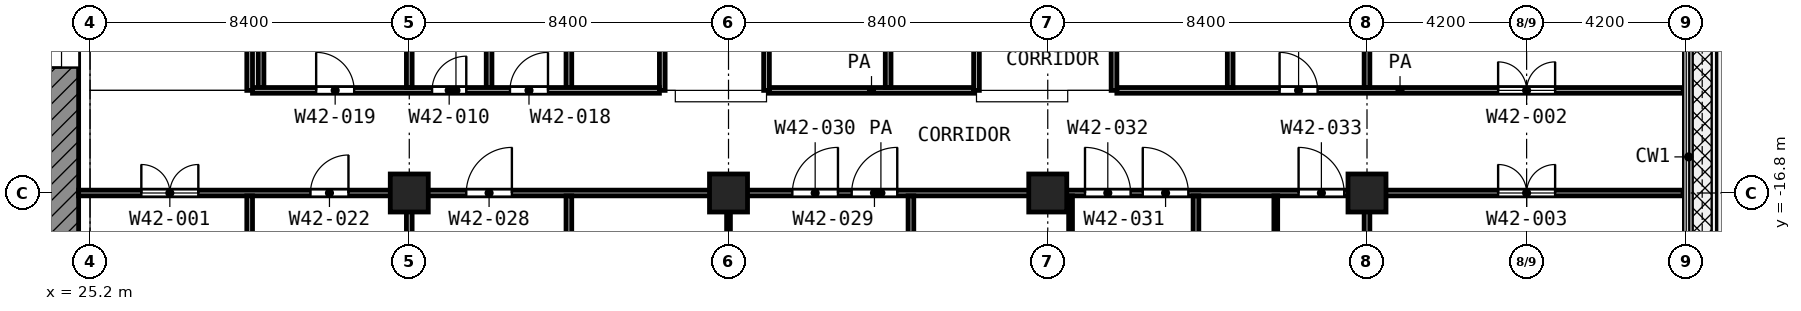
"""IFC4 building model, lengths in metres.
Left out: names, types, materials, properties, quantities, classifications, styles, units other than length and angle.
Written with IfcOpenShell. Run it as: python <this file> out.ifc"""

import sys

from ifc_helpers import new_model, si_unit, direction, frame, frame_2d, origin, origin_2d, place, context, subcontext, project, spatial, rectangle, extrude, element, fill, save


model = new_model("IFC4")
c1 = context("Model", 3, precision=1e-05, world=origin(), true_north=direction((0.0, 1.0)))
c2 = subcontext(c1, "Body", "Model", "MODEL_VIEW")
j1 = project(units=[si_unit("LENGTHUNIT", "METRE"), si_unit("PLANEANGLEUNIT", "RADIAN")], contexts=[c1])
p1 = place(None, origin())
s1 = spatial("IfcSite", under=j1, at=p1, CompositionType="ELEMENT")
p2 = place(p1, origin())
s2 = spatial("IfcBuilding", under=s1, at=p2, CompositionType="ELEMENT")
p3 = place(p2, frame((0.0, 0.0, 183.6)))
s3 = spatial("IfcBuildingStorey", under=s2, at=p3, CompositionType="ELEMENT", Elevation=183.6)
for number, where, z_axis, x_axis in (
    (1, (33.6, -16.8, 0.0), (0.0, 0.0, 1.0), (1.0, 0.0, 0.0)),
    (2, (42.0, -16.8, 0.0), (0.0, 0.0, 1.0), (1.0, 0.0, 0.0)),
    (3, (50.4, -16.8, 0.0), (0.0, 0.0, 1.0), (1.0, 0.0, 0.0)),
    (4, (58.8, -16.8, 0.0), (0.0, 0.0, 1.0), (1.0, 0.0, 0.0)),
):
    element("IfcColumn", number, at=place(p3, frame(where, z_axis=z_axis, x_axis=x_axis)), inside=s3, PredefinedType="COLUMN", context=c2, shape_type="SweptSolid", body=[
        extrude(rectangle(XDim=1.0, YDim=1.0, at=origin_2d()), origin(), (0.0, 0.0, 1.0), 4.2),
    ])
p4 = place(p3, frame((24.45, -24.0, 0.0), z_axis=(0.0, 0.0, 1.0), x_axis=(0.0, 1.0, 0.0)))
e5 = element("IfcWall", 5, at=p4, inside=s3, PredefinedType="SHEAR", context=c2, shape_type="SweptSolid", body=[
    extrude(rectangle(XDim=18.6, YDim=0.9, at=frame_2d((9.3, 0.0))), origin(), (0.0, 0.0, 1.0), 3.6),
])
p5 = place(p4, frame((10.5, 0.0, 0.0)))
e6 = element("IfcOpeningElement", 6, at=p5, cuts=e5, PredefinedType="OPENING", context=c2, shape_type="SweptSolid", body=[
    extrude(rectangle(XDim=1.8, YDim=2.1, at=frame_2d((0.9, 1.05))), frame((0.0, 0.46, 0.0), z_axis=(0.0, -1.0, 0.0), x_axis=(1.0, 0.0, 0.0)), (0.0, 0.0, 1.0), 0.92),
])
p6 = place(p3, frame((42.0, -26.35, 0.0), z_axis=(0.0, 0.0, 1.0), x_axis=(0.0, 1.0, 0.0)))
e7 = element("IfcWall", 7, at=p6, inside=s3, PredefinedType="PARTITIONING", context=c2, shape_type="SweptSolid", body=[
    extrude(rectangle(XDim=9.475, YDim=0.1, at=frame_2d((4.738, 0.0))), origin(), (0.0, 0.0, 1.0), 3.6),
])
p7 = place(p6, frame((4.25, 0.0, 0.0)))
e8 = element("IfcOpeningElement", 8, at=p7, cuts=e7, PredefinedType="OPENING", context=c2, shape_type="SweptSolid", body=[
    extrude(rectangle(XDim=1.0, YDim=2.1, at=frame_2d((0.5, 1.05))), frame((0.0, 0.06, 0.0), z_axis=(0.0, -1.0, 0.0), x_axis=(1.0, 0.0, 0.0)), (0.0, 0.0, 1.0), 0.12),
])
p8 = place(p3, frame((51.0, -26.35, 0.0), z_axis=(0.0, 0.0, 1.0), x_axis=(0.0, 1.0, 0.0)))
e9 = element("IfcWall", 9, at=p8, inside=s3, PredefinedType="PARTITIONING", context=c2, shape_type="SweptSolid", body=[
    extrude(rectangle(XDim=9.475, YDim=0.1, at=frame_2d((4.738, 0.0))), origin(), (0.0, 0.0, 1.0), 3.6),
])
p9 = place(p8, frame((4.25, 0.0, 0.0)))
e10 = element("IfcOpeningElement", 10, at=p9, cuts=e9, PredefinedType="OPENING", context=c2, shape_type="SweptSolid", body=[
    extrude(rectangle(XDim=1.0, YDim=2.1, at=frame_2d((0.5, 1.05))), frame((0.0, 0.06, 0.0), z_axis=(0.0, -1.0, 0.0), x_axis=(1.0, 0.0, 0.0)), (0.0, 0.0, 1.0), 0.12),
])
p10 = place(p3, frame((56.4, -20.1, 0.0), z_axis=(0.0, 0.0, 1.0), x_axis=(0.0, 1.0, 0.0)))
e11 = element("IfcWall", 11, at=p10, inside=s3, PredefinedType="PARTITIONING", context=c2, shape_type="SweptSolid", body=[
    extrude(rectangle(XDim=3.225, YDim=0.1, at=frame_2d((1.613, 0.0))), origin(), (0.0, 0.0, 1.0), 3.6),
])
p11 = place(p3, frame((24.9, -16.8, 0.0), z_axis=(0.0, 0.0, 1.0), x_axis=(1.0, 0.0, 0.0)))
e12 = element("IfcWall", 12, at=p11, inside=s3, PredefinedType="PARTITIONING", context=c2, shape_type="SweptSolid", body=[
    extrude(rectangle(XDim=42.22, YDim=0.15, at=frame_2d((21.11, 0.0))), origin(), (0.0, 0.0, 1.0), 3.6),
])
p12 = place(p11, frame((1.65, 0.0, 0.0)))
e13 = element("IfcOpeningElement", 13, at=p12, cuts=e12, PredefinedType="OPENING", context=c2, shape_type="SweptSolid", body=[
    extrude(rectangle(XDim=1.5, YDim=2.1, at=frame_2d((0.75, 1.05))), frame((0.0, 0.085, 0.0), z_axis=(0.0, -1.0, 0.0), x_axis=(1.0, 0.0, 0.0)), (0.0, 0.0, 1.0), 0.17),
])
p13 = place(p11, frame((6.1, 0.0, 0.0)))
e14 = element("IfcOpeningElement", 14, at=p13, cuts=e12, PredefinedType="OPENING", context=c2, shape_type="SweptSolid", body=[
    extrude(rectangle(XDim=1.0, YDim=2.1, at=frame_2d((0.5, 1.05))), frame((0.0, 0.085, 0.0), z_axis=(0.0, -1.0, 0.0), x_axis=(1.0, 0.0, 0.0)), (0.0, 0.0, 1.0), 0.17),
])
p14 = place(p11, frame((10.2, 0.0, 0.0)))
e15 = element("IfcOpeningElement", 15, at=p14, cuts=e12, PredefinedType="OPENING", context=c2, shape_type="SweptSolid", body=[
    extrude(rectangle(XDim=1.2, YDim=2.1, at=frame_2d((0.6, 1.05))), frame((0.0, 0.085, 0.0), z_axis=(0.0, -1.0, 0.0), x_axis=(1.0, 0.0, 0.0)), (0.0, 0.0, 1.0), 0.17),
])
p15 = place(p11, frame((20.34, 0.0, 0.0)))
e16 = element("IfcOpeningElement", 16, at=p15, cuts=e12, PredefinedType="OPENING", context=c2, shape_type="SweptSolid", body=[
    extrude(rectangle(XDim=1.2, YDim=2.1, at=frame_2d((0.6, 1.05))), frame((0.0, 0.085, 0.0), z_axis=(0.0, -1.0, 0.0), x_axis=(1.0, 0.0, 0.0)), (0.0, 0.0, 1.0), 0.17),
])
p16 = place(p11, frame((18.78, 0.0, 0.0)))
e17 = element("IfcOpeningElement", 17, at=p16, cuts=e12, PredefinedType="OPENING", context=c2, shape_type="SweptSolid", body=[
    extrude(rectangle(XDim=1.2, YDim=2.1, at=frame_2d((0.6, 1.05))), frame((0.0, 0.085, 0.0), z_axis=(0.0, -1.0, 0.0), x_axis=(1.0, 0.0, 0.0)), (0.0, 0.0, 1.0), 0.17),
])
p17 = place(p11, frame((28.0, 0.0, 0.0)))
e18 = element("IfcOpeningElement", 18, at=p17, cuts=e12, PredefinedType="OPENING", context=c2, shape_type="SweptSolid", body=[
    extrude(rectangle(XDim=1.2, YDim=2.1, at=frame_2d((0.6, 1.05))), frame((0.0, 0.085, 0.0), z_axis=(0.0, -1.0, 0.0), x_axis=(1.0, 0.0, 0.0)), (0.0, 0.0, 1.0), 0.17),
])
p18 = place(p11, frame((26.48, 0.0, 0.0)))
e19 = element("IfcOpeningElement", 19, at=p18, cuts=e12, PredefinedType="OPENING", context=c2, shape_type="SweptSolid", body=[
    extrude(rectangle(XDim=1.2, YDim=2.1, at=frame_2d((0.6, 1.05))), frame((0.0, 0.085, 0.0), z_axis=(0.0, -1.0, 0.0), x_axis=(1.0, 0.0, 0.0)), (0.0, 0.0, 1.0), 0.17),
])
p19 = place(p11, frame((32.1, 0.0, 0.0)))
e20 = element("IfcOpeningElement", 20, at=p19, cuts=e12, PredefinedType="OPENING", context=c2, shape_type="SweptSolid", body=[
    extrude(rectangle(XDim=1.2, YDim=2.1, at=frame_2d((0.6, 1.05))), frame((0.0, 0.085, 0.0), z_axis=(0.0, -1.0, 0.0), x_axis=(1.0, 0.0, 0.0)), (0.0, 0.0, 1.0), 0.17),
])
p20 = place(p11, frame((37.35, 0.0, 0.0)))
e21 = element("IfcOpeningElement", 21, at=p20, cuts=e12, PredefinedType="OPENING", context=c2, shape_type="SweptSolid", body=[
    extrude(rectangle(XDim=1.5, YDim=2.1, at=frame_2d((0.75, 1.05))), frame((0.0, 0.085, 0.0), z_axis=(0.0, -1.0, 0.0), x_axis=(1.0, 0.0, 0.0)), (0.0, 0.0, 1.0), 0.17),
])
p21 = place(p3, frame((29.475, -14.1, 0.0), z_axis=(0.0, 0.0, 1.0), x_axis=(1.0, 0.0, 0.0)))
e22 = element("IfcWall", 22, at=p21, inside=s3, PredefinedType="PARTITIONING", context=c2, shape_type="SweptSolid", body=[
    extrude(rectangle(XDim=10.707, YDim=0.15, at=frame_2d((5.354, 0.0))), origin(), (0.0, 0.0, 1.0), 3.6),
])
p22 = place(p21, frame((1.675, 0.0, 0.0)))
e23 = element("IfcOpeningElement", 23, at=p22, cuts=e22, PredefinedType="OPENING", context=c2, shape_type="SweptSolid", body=[
    extrude(rectangle(XDim=1.0, YDim=2.1, at=frame_2d((0.5, 1.05))), frame((0.0, 0.085, 0.0), z_axis=(0.0, -1.0, 0.0), x_axis=(1.0, 0.0, 0.0)), (0.0, 0.0, 1.0), 0.17),
])
p23 = place(p21, frame((4.725, 0.0, 0.0)))
e24 = element("IfcOpeningElement", 24, at=p23, cuts=e22, PredefinedType="OPENING", context=c2, shape_type="SweptSolid", body=[
    extrude(rectangle(XDim=0.9, YDim=2.1, at=frame_2d((0.45, 1.05))), frame((0.0, 0.085, 0.0), z_axis=(0.0, -1.0, 0.0), x_axis=(1.0, 0.0, 0.0)), (0.0, 0.0, 1.0), 0.17),
])
p24 = place(p21, frame((6.775, 0.0, 0.0)))
e25 = element("IfcOpeningElement", 25, at=p24, cuts=e22, PredefinedType="OPENING", context=c2, shape_type="SweptSolid", body=[
    extrude(rectangle(XDim=1.0, YDim=2.1, at=frame_2d((0.5, 1.05))), frame((0.0, 0.085, 0.0), z_axis=(0.0, -1.0, 0.0), x_axis=(1.0, 0.0, 0.0)), (0.0, 0.0, 1.0), 0.17),
])
p25 = place(p3, frame((43.075, -14.1, 0.0), z_axis=(0.0, 0.0, 1.0), x_axis=(1.0, 0.0, 0.0)))
e26 = element("IfcWall", 26, at=p25, inside=s3, PredefinedType="PARTITIONING", context=c2, shape_type="SweptSolid", body=[
    extrude(rectangle(XDim=5.375, YDim=0.15, at=frame_2d((2.688, 0.0))), origin(), (0.0, 0.0, 1.0), 3.6),
])
p26 = place(p3, frame((52.218, -14.1, 0.0), z_axis=(0.0, 0.0, 1.0), x_axis=(1.0, 0.0, 0.0)))
e27 = element("IfcWall", 27, at=p26, inside=s3, PredefinedType="PARTITIONING", context=c2, shape_type="SweptSolid", body=[
    extrude(rectangle(XDim=14.902, YDim=0.15, at=frame_2d((7.451, 0.0))), origin(), (0.0, 0.0, 1.0), 3.6),
])
p27 = place(p26, frame((4.282, 0.0, 0.0)))
e28 = element("IfcOpeningElement", 28, at=p27, cuts=e27, PredefinedType="OPENING", context=c2, shape_type="SweptSolid", body=[
    extrude(rectangle(XDim=1.0, YDim=2.1, at=frame_2d((0.5, 1.05))), frame((0.0, 0.085, 0.0), z_axis=(0.0, -1.0, 0.0), x_axis=(1.0, 0.0, 0.0)), (0.0, 0.0, 1.0), 0.17),
])
p28 = place(p26, frame((10.032, 0.0, 0.0)))
e29 = element("IfcOpeningElement", 29, at=p28, cuts=e27, PredefinedType="OPENING", context=c2, shape_type="SweptSolid", body=[
    extrude(rectangle(XDim=1.5, YDim=2.1, at=frame_2d((0.75, 1.05))), frame((0.0, 0.085, 0.0), z_axis=(0.0, -1.0, 0.0), x_axis=(1.0, 0.0, 0.0)), (0.0, 0.0, 1.0), 0.17),
])
p29 = place(p3, frame((29.4, -31.198, 0.0), z_axis=(0.0, 0.0, 1.0), x_axis=(0.0, 1.0, 0.0)))
e30 = element("IfcWall", 30, at=p29, inside=s3, PredefinedType="PARTITIONING", context=c2, shape_type="SweptSolid", body=[
    extrude(rectangle(XDim=14.323, YDim=0.15, at=frame_2d((7.162, 0.0))), origin(), (0.0, 0.0, 1.0), 3.6),
])
p30 = place(p3, frame((29.4, -14.1, 0.0), z_axis=(0.0, 0.0, 1.0), x_axis=(0.0, 1.0, 0.0)))
e31 = element("IfcWall", 31, at=p30, inside=s3, PredefinedType="PARTITIONING", context=c2, shape_type="SweptSolid", body=[
    extrude(rectangle(XDim=2.998, YDim=0.15, at=frame_2d((1.499, 0.0))), origin(), (0.0, 0.0, 1.0), 3.6),
])
p31 = place(p3, frame((29.7, -14.025, 0.0), z_axis=(0.0, 0.0, 1.0), x_axis=(0.0, 1.0, 0.0)))
e32 = element("IfcWall", 32, at=p31, inside=s3, PredefinedType="PARTITIONING", context=c2, shape_type="SweptSolid", body=[
    extrude(rectangle(XDim=13.945, YDim=0.15, at=frame_2d((6.972, 0.0))), origin(), (0.0, 0.0, 1.0), 2.7),
])
p32 = place(p3, frame((33.6, -31.12, 0.0), z_axis=(0.0, 0.0, 1.0), x_axis=(0.0, 1.0, 0.0)))
e33 = element("IfcWall", 33, at=p32, inside=s3, PredefinedType="PARTITIONING", context=c2, shape_type="SweptSolid", body=[
    extrude(rectangle(XDim=14.245, YDim=0.15, at=frame_2d((7.123, 0.0))), origin(), (0.0, 0.0, 1.0), 3.6),
])
p33 = place(p3, frame((33.6, -14.025, 0.0), z_axis=(0.0, 0.0, 1.0), x_axis=(0.0, 1.0, 0.0)))
e34 = element("IfcWall", 34, at=p33, inside=s3, PredefinedType="PARTITIONING", context=c2, shape_type="SweptSolid", body=[
    extrude(rectangle(XDim=5.125, YDim=0.15, at=frame_2d((2.562, 0.0))), origin(), (0.0, 0.0, 1.0), 3.6),
])
p34 = place(p3, frame((35.7, -14.025, 0.0), z_axis=(0.0, 0.0, 1.0), x_axis=(0.0, 1.0, 0.0)))
e35 = element("IfcWall", 35, at=p34, inside=s3, PredefinedType="PARTITIONING", context=c2, shape_type="SweptSolid", body=[
    extrude(rectangle(XDim=13.945, YDim=0.15, at=frame_2d((6.972, 0.0))), origin(), (0.0, 0.0, 1.0), 2.7),
])
p35 = place(p3, frame((37.8, -31.12, 0.0), z_axis=(0.0, 0.0, 1.0), x_axis=(0.0, 1.0, 0.0)))
e36 = element("IfcWall", 36, at=p35, inside=s3, PredefinedType="PARTITIONING", context=c2, shape_type="SweptSolid", body=[
    extrude(rectangle(XDim=14.245, YDim=0.15, at=frame_2d((7.123, 0.0))), origin(), (0.0, 0.0, 1.0), 3.6),
])
p36 = place(p3, frame((37.8, -14.025, 0.0), z_axis=(0.0, 0.0, 1.0), x_axis=(0.0, 1.0, 0.0)))
e37 = element("IfcWall", 37, at=p36, inside=s3, PredefinedType="PARTITIONING", context=c2, shape_type="SweptSolid", body=[
    extrude(rectangle(XDim=13.945, YDim=0.15, at=frame_2d((6.972, 0.0))), origin(), (0.0, 0.0, 1.0), 2.7),
])
p37 = place(p3, frame((40.257, -14.1, 0.0), z_axis=(0.0, 0.0, 1.0), x_axis=(0.0, 1.0, 0.0)))
e38 = element("IfcWall", 38, at=p37, inside=s3, PredefinedType="PARTITIONING", context=c2, shape_type="SweptSolid", body=[
    extrude(rectangle(XDim=14.02, YDim=0.15, at=frame_2d((7.01, 0.0))), origin(), (0.0, 0.0, 1.0), 2.7),
])
p38 = place(p37, frame((6.374, 0.0, 0.0)))
e39 = element("IfcOpeningElement", 39, at=p38, cuts=e38, PredefinedType="OPENING", context=c2, shape_type="SweptSolid", body=[
    extrude(rectangle(XDim=1.0, YDim=2.1, at=frame_2d((0.5, 1.05))), frame((0.0, 0.085, 0.0), z_axis=(0.0, -1.0, 0.0), x_axis=(1.0, 0.0, 0.0)), (0.0, 0.0, 1.0), 0.17),
])
p39 = place(p3, frame((43.0, -14.1, 0.0), z_axis=(0.0, 0.0, 1.0), x_axis=(0.0, 1.0, 0.0)))
e40 = element("IfcWall", 40, at=p39, inside=s3, PredefinedType="PARTITIONING", context=c2, shape_type="SweptSolid", body=[
    extrude(rectangle(XDim=5.2, YDim=0.15, at=frame_2d((2.6, 0.0))), origin(), (0.0, 0.0, 1.0), 3.6),
])
p40 = place(p39, frame((2.0, 0.0, 0.0)))
e41 = element("IfcOpeningElement", 41, at=p40, cuts=e40, PredefinedType="OPENING", context=c2, shape_type="SweptSolid", body=[
    extrude(rectangle(XDim=1.2, YDim=2.1, at=frame_2d((0.6, 1.05))), frame((0.0, 0.085, 0.0), z_axis=(0.0, -1.0, 0.0), x_axis=(1.0, 0.0, 0.0)), (0.0, 0.0, 1.0), 0.17),
])
p41 = place(p3, frame((46.2, -14.025, 0.0), z_axis=(0.0, 0.0, 1.0), x_axis=(0.0, 1.0, 0.0)))
e42 = element("IfcWall", 42, at=p41, inside=s3, PredefinedType="PARTITIONING", context=c2, shape_type="SweptSolid", body=[
    extrude(rectangle(XDim=5.295, YDim=0.15, at=frame_2d((2.647, 0.0))), origin(), (0.0, 0.0, 1.0), 3.6),
])
p42 = place(p3, frame((46.8, -31.12, 0.0), z_axis=(0.0, 0.0, 1.0), x_axis=(0.0, 1.0, 0.0)))
e43 = element("IfcWall", 43, at=p42, inside=s3, PredefinedType="PARTITIONING", context=c2, shape_type="SweptSolid", body=[
    extrude(rectangle(XDim=14.245, YDim=0.15, at=frame_2d((7.123, 0.0))), origin(), (0.0, 0.0, 1.0), 3.6),
])
p43 = place(p3, frame((48.525, -14.1, 0.0), z_axis=(0.0, 0.0, 1.0), x_axis=(0.0, 1.0, 0.0)))
e44 = element("IfcWall", 44, at=p43, inside=s3, PredefinedType="PARTITIONING", context=c2, shape_type="SweptSolid", body=[
    extrude(rectangle(XDim=5.37, YDim=0.15, at=frame_2d((2.685, 0.0))), origin(), (0.0, 0.0, 1.0), 3.6),
])
p44 = place(p43, frame((2.185, 0.0, 0.0)))
e45 = element("IfcOpeningElement", 45, at=p44, cuts=e44, PredefinedType="OPENING", context=c2, shape_type="SweptSolid", body=[
    extrude(rectangle(XDim=1.0, YDim=2.1, at=frame_2d((0.5, 1.05))), frame((0.0, 0.085, 0.0), z_axis=(0.0, -1.0, 0.0), x_axis=(1.0, 0.0, 0.0)), (0.0, 0.0, 1.0), 0.17),
])
p45 = place(p3, frame((52.143, -14.1, 0.0), z_axis=(0.0, 0.0, 1.0), x_axis=(0.0, 1.0, 0.0)))
e46 = element("IfcWall", 46, at=p45, inside=s3, PredefinedType="PARTITIONING", context=c2, shape_type="SweptSolid", body=[
    extrude(rectangle(XDim=12.249, YDim=0.15, at=frame_2d((6.125, 0.0))), origin(), (0.0, 0.0, 1.0), 3.6),
])
p46 = place(p45, frame((6.224, 0.0, 0.0)))
e47 = element("IfcOpeningElement", 47, at=p46, cuts=e46, PredefinedType="OPENING", context=c2, shape_type="SweptSolid", body=[
    extrude(rectangle(XDim=1.0, YDim=2.1, at=frame_2d((0.5, 1.05))), frame((0.0, 0.085, 0.0), z_axis=(0.0, -1.0, 0.0), x_axis=(1.0, 0.0, 0.0)), (0.0, 0.0, 1.0), 0.17),
])
p47 = place(p3, frame((54.3, -31.12, 0.0), z_axis=(0.0, 0.0, 1.0), x_axis=(0.0, 1.0, 0.0)))
e48 = element("IfcWall", 48, at=p47, inside=s3, PredefinedType="PARTITIONING", context=c2, shape_type="SweptSolid", body=[
    extrude(rectangle(XDim=14.245, YDim=0.15, at=frame_2d((7.123, 0.0))), origin(), (0.0, 0.0, 1.0), 3.6),
])
p48 = place(p3, frame((55.2, -14.025, 0.0), z_axis=(0.0, 0.0, 1.0), x_axis=(0.0, 1.0, 0.0)))
e49 = element("IfcWall", 49, at=p48, inside=s3, PredefinedType="PARTITIONING", context=c2, shape_type="SweptSolid", body=[
    extrude(rectangle(XDim=13.945, YDim=0.15, at=frame_2d((6.972, 0.0))), origin(), (0.0, 0.0, 1.0), 2.7),
])
p49 = place(p3, frame((58.8, -31.12, 0.0), z_axis=(0.0, 0.0, 1.0), x_axis=(0.0, 1.0, 0.0)))
e50 = element("IfcWall", 50, at=p49, inside=s3, PredefinedType="PARTITIONING", context=c2, shape_type="SweptSolid", body=[
    extrude(rectangle(XDim=14.245, YDim=0.15, at=frame_2d((7.123, 0.0))), origin(), (0.0, 0.0, 1.0), 3.6),
])
p50 = place(p3, frame((58.8, -14.025, 0.0), z_axis=(0.0, 0.0, 1.0), x_axis=(0.0, 1.0, 0.0)))
e51 = element("IfcWall", 51, at=p50, inside=s3, PredefinedType="PARTITIONING", context=c2, shape_type="SweptSolid", body=[
    extrude(rectangle(XDim=13.945, YDim=0.15, at=frame_2d((6.972, 0.0))), origin(), (0.0, 0.0, 1.0), 2.7),
])
p51 = place(p5, origin())
e52 = element("IfcDoor", 52, at=p51, inside=s3, OperationType="DOUBLE_DOOR_SINGLE_SWING", PredefinedType="DOOR", context=c2, shape_type="SweptSolid", body=[
    extrude(rectangle(XDim=1.8, YDim=2.1, at=frame_2d((0.9, 1.05))), frame((0.0, 0.025, 0.0), z_axis=(0.0, -1.0, 0.0), x_axis=(1.0, 0.0, 0.0)), (0.0, 0.0, 1.0), 0.05),
])
fill(e6, e52)
p52 = place(p12, origin())
e53 = element("IfcDoor", 53, at=p52, inside=s3, OperationType="DOUBLE_DOOR_SINGLE_SWING", PredefinedType="DOOR", context=c2, shape_type="SweptSolid", body=[
    extrude(rectangle(XDim=1.5, YDim=2.1, at=frame_2d((0.75, 1.05))), frame((0.0, 0.025, 0.0), z_axis=(0.0, -1.0, 0.0), x_axis=(1.0, 0.0, 0.0)), (0.0, 0.0, 1.0), 0.05),
])
fill(e13, e53)
p53 = place(p22, origin())
e54 = element("IfcDoor", 54, at=p53, inside=s3, OperationType="SINGLE_SWING_LEFT", PredefinedType="DOOR", context=c2, shape_type="SweptSolid", body=[
    extrude(rectangle(XDim=1.0, YDim=2.1, at=frame_2d((0.5, 1.05))), frame((0.0, 0.025, 0.0), z_axis=(0.0, -1.0, 0.0), x_axis=(1.0, 0.0, 0.0)), (0.0, 0.0, 1.0), 0.05),
])
fill(e23, e54)
p54 = place(p27, origin())
e55 = element("IfcDoor", 55, at=p54, inside=s3, OperationType="SINGLE_SWING_LEFT", PredefinedType="DOOR", context=c2, shape_type="SweptSolid", body=[
    extrude(rectangle(XDim=1.0, YDim=2.1, at=frame_2d((0.5, 1.05))), frame((0.0, 0.025, 0.0), z_axis=(0.0, -1.0, 0.0), x_axis=(1.0, 0.0, 0.0)), (0.0, 0.0, 1.0), 0.05),
])
fill(e28, e55)
p55 = place(p28, origin())
e56 = element("IfcDoor", 56, at=p55, inside=s3, OperationType="DOUBLE_DOOR_SINGLE_SWING", PredefinedType="DOOR", context=c2, shape_type="SweptSolid", body=[
    extrude(rectangle(XDim=1.5, YDim=2.1, at=frame_2d((0.75, 1.05))), frame((0.0, 0.025, 0.0), z_axis=(0.0, -1.0, 0.0), x_axis=(1.0, 0.0, 0.0)), (0.0, 0.0, 1.0), 0.05),
])
fill(e29, e56)
p56 = place(p13, origin())
e57 = element("IfcDoor", 57, at=p56, inside=s3, OperationType="SINGLE_SWING_RIGHT", PredefinedType="DOOR", context=c2, shape_type="SweptSolid", body=[
    extrude(rectangle(XDim=1.0, YDim=2.1, at=frame_2d((0.5, 1.05))), frame((0.0, 0.025, 0.0), z_axis=(0.0, -1.0, 0.0), x_axis=(1.0, 0.0, 0.0)), (0.0, 0.0, 1.0), 0.05),
])
fill(e14, e57)
p57 = place(p14, origin())
e58 = element("IfcDoor", 58, at=p57, inside=s3, OperationType="SINGLE_SWING_RIGHT", PredefinedType="DOOR", context=c2, shape_type="SweptSolid", body=[
    extrude(rectangle(XDim=1.2, YDim=2.1, at=frame_2d((0.6, 1.05))), frame((0.0, 0.025, 0.0), z_axis=(0.0, -1.0, 0.0), x_axis=(1.0, 0.0, 0.0)), (0.0, 0.0, 1.0), 0.05),
])
fill(e15, e58)
p58 = place(p15, origin())
e59 = element("IfcDoor", 59, at=p58, inside=s3, OperationType="SINGLE_SWING_RIGHT", PredefinedType="DOOR", context=c2, shape_type="SweptSolid", body=[
    extrude(rectangle(XDim=1.2, YDim=2.1, at=frame_2d((0.6, 1.05))), frame((0.0, 0.025, 0.0), z_axis=(0.0, -1.0, 0.0), x_axis=(1.0, 0.0, 0.0)), (0.0, 0.0, 1.0), 0.05),
])
fill(e16, e59)
p59 = place(p16, origin())
e60 = element("IfcDoor", 60, at=p59, inside=s3, OperationType="SINGLE_SWING_RIGHT", PredefinedType="DOOR", context=c2, shape_type="SweptSolid", body=[
    extrude(rectangle(XDim=1.2, YDim=2.1, at=frame_2d((0.6, 1.05))), frame((0.0, 0.025, 0.0), z_axis=(0.0, -1.0, 0.0), x_axis=(1.0, 0.0, 0.0)), (0.0, 0.0, 1.0), 0.05),
])
fill(e17, e60)
p60 = place(p17, origin())
e61 = element("IfcDoor", 61, at=p60, inside=s3, OperationType="SINGLE_SWING_LEFT", PredefinedType="DOOR", context=c2, shape_type="SweptSolid", body=[
    extrude(rectangle(XDim=1.2, YDim=2.1, at=frame_2d((0.6, 1.05))), frame((0.0, 0.025, 0.0), z_axis=(0.0, -1.0, 0.0), x_axis=(1.0, 0.0, 0.0)), (0.0, 0.0, 1.0), 0.05),
])
fill(e18, e61)
p61 = place(p18, origin())
e62 = element("IfcDoor", 62, at=p61, inside=s3, OperationType="SINGLE_SWING_LEFT", PredefinedType="DOOR", context=c2, shape_type="SweptSolid", body=[
    extrude(rectangle(XDim=1.2, YDim=2.1, at=frame_2d((0.6, 1.05))), frame((0.0, 0.025, 0.0), z_axis=(0.0, -1.0, 0.0), x_axis=(1.0, 0.0, 0.0)), (0.0, 0.0, 1.0), 0.05),
])
fill(e19, e62)
p62 = place(p19, origin())
e63 = element("IfcDoor", 63, at=p62, inside=s3, OperationType="SINGLE_SWING_LEFT", PredefinedType="DOOR", context=c2, shape_type="SweptSolid", body=[
    extrude(rectangle(XDim=1.2, YDim=2.1, at=frame_2d((0.6, 1.05))), frame((0.0, 0.025, 0.0), z_axis=(0.0, -1.0, 0.0), x_axis=(1.0, 0.0, 0.0)), (0.0, 0.0, 1.0), 0.05),
])
fill(e20, e63)
p63 = place(p20, origin())
e64 = element("IfcDoor", 64, at=p63, inside=s3, OperationType="DOUBLE_DOOR_SINGLE_SWING", PredefinedType="DOOR", context=c2, shape_type="SweptSolid", body=[
    extrude(rectangle(XDim=1.5, YDim=2.1, at=frame_2d((0.75, 1.05))), frame((0.0, 0.025, 0.0), z_axis=(0.0, -1.0, 0.0), x_axis=(1.0, 0.0, 0.0)), (0.0, 0.0, 1.0), 0.05),
])
fill(e21, e64)
p64 = place(p23, origin())
e65 = element("IfcDoor", 65, at=p64, inside=s3, OperationType="SINGLE_SWING_RIGHT", PredefinedType="DOOR", context=c2, shape_type="SweptSolid", body=[
    extrude(rectangle(XDim=0.9, YDim=2.1, at=frame_2d((0.45, 1.05))), frame((0.0, 0.025, 0.0), z_axis=(0.0, -1.0, 0.0), x_axis=(1.0, 0.0, 0.0)), (0.0, 0.0, 1.0), 0.05),
])
fill(e24, e65)
p65 = place(p24, origin())
e66 = element("IfcDoor", 66, at=p65, inside=s3, OperationType="SINGLE_SWING_RIGHT", PredefinedType="DOOR", context=c2, shape_type="SweptSolid", body=[
    extrude(rectangle(XDim=1.0, YDim=2.1, at=frame_2d((0.5, 1.05))), frame((0.0, 0.025, 0.0), z_axis=(0.0, -1.0, 0.0), x_axis=(1.0, 0.0, 0.0)), (0.0, 0.0, 1.0), 0.05),
])
fill(e25, e66)
save(model, sys.argv[1])
